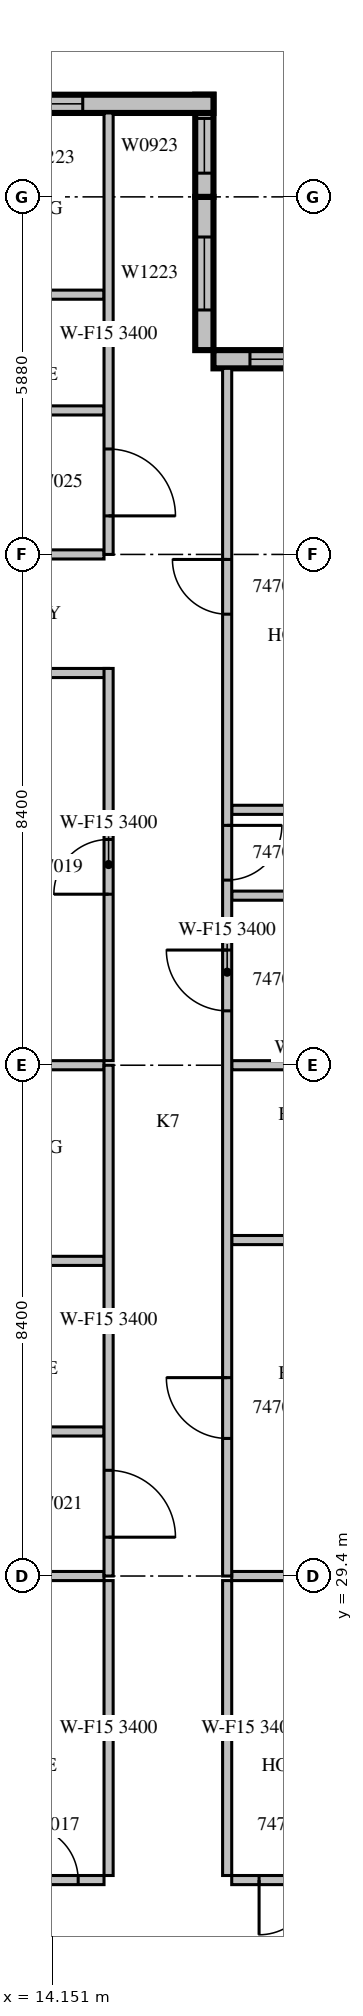
"""IFC4 building model, lengths in metres.
Left out: names, types, materials, properties, quantities, classifications, styles, units other than length and angle.
Written with IfcOpenShell. Run it as: python <this file> out.ifc"""

import sys

from ifc_helpers import new_model, si_unit, direction, frame, frame_2d, origin, place, context, subcontext, project, spatial, rectangle, extrude, source, transform, mapped, element, fill, save


model = new_model("IFC4")
c1 = context("Model", 3, precision=1e-05, world=origin(), true_north=direction((0.0, 1.0)))
c2 = subcontext(c1, "Body", "Model", "MODEL_VIEW")
j1 = project(units=[si_unit("LENGTHUNIT", "METRE"), si_unit("PLANEANGLEUNIT", "RADIAN")], contexts=[c1])
p1 = place(None, origin())
s1 = spatial("IfcSite", under=j1, at=p1, CompositionType="ELEMENT")
p2 = place(p1, origin())
s2 = spatial("IfcBuilding", under=s1, at=p2, CompositionType="ELEMENT")
p3 = place(p2, frame((0.0, 0.0, 212.0)))
s3 = spatial("IfcBuildingStorey", under=s2, at=p3, CompositionType="ELEMENT", Elevation=212.0)
m1 = source(origin(), c2, "Body", "SweptSolid", [
    extrude(rectangle(XDim=4.2, YDim=0.3, at=frame_2d((2.1, 0.0))), origin(), (0.0, 0.0, 1.0), 3.4),
])
p4 = place(p3, frame((21.0, 49.41, 0.0), z_axis=(0.0, 0.0, 1.0), x_axis=(-1.0, 0.0, 0.0)))
e1 = element("IfcWall", 1, at=p4, inside=s3, PredefinedType="STANDARD", context=c2, shape_type="MappedRepresentation", body=[
    mapped(m1, transform((0.0, 0.0, 0.0), scale=1.0)),
])
m2 = source(origin(), c2, "Body", "SweptSolid", [
    extrude(rectangle(XDim=3.0, YDim=2.3, at=frame_2d((1.5, 1.15))), frame((0.0, 0.16, 0.0), z_axis=(0.0, -1.0, 0.0), x_axis=(1.0, 0.0, 0.0)), (0.0, 0.0, 1.0), 0.32),
])
p5 = place(p4, frame((0.6, 0.0, 0.6)))
e2 = element("IfcOpeningElement", 2, at=p5, cuts=e1, PredefinedType="OPENING", context=c2, shape_type="MappedRepresentation", body=[
    mapped(m2, transform((0.0, 0.0, 0.0), scale=1.0)),
])
m3 = source(origin(), c2, "Body", "SweptSolid", [
    extrude(rectangle(XDim=2.52, YDim=0.3, at=frame_2d((1.26, 0.0))), origin(), (0.0, 0.0, 1.0), 3.4),
])
p6 = place(p3, frame((16.65, 49.56, 0.0), z_axis=(0.0, 0.0, 1.0), x_axis=(0.0, 1.0, 0.0)))
e3 = element("IfcWall", 3, at=p6, inside=s3, PredefinedType="STANDARD", context=c2, shape_type="MappedRepresentation", body=[
    mapped(m3, transform((0.0, 0.0, 0.0), scale=1.0)),
])
m4 = source(origin(), c2, "Body", "SweptSolid", [
    extrude(rectangle(XDim=1.2, YDim=2.3, at=frame_2d((0.6, 1.15))), frame((0.0, 0.16, 0.0), z_axis=(0.0, -1.0, 0.0), x_axis=(1.0, 0.0, 0.0)), (0.0, 0.0, 1.0), 0.32),
])
p7 = place(p6, frame((0.66, 0.0, 0.6)))
e4 = element("IfcOpeningElement", 4, at=p7, cuts=e3, PredefinedType="OPENING", context=c2, shape_type="MappedRepresentation", body=[
    mapped(m4, transform((0.0, 0.0, 0.0), scale=1.0)),
])
m5 = source(origin(), c2, "Body", "SweptSolid", [
    extrude(rectangle(XDim=1.68, YDim=0.3, at=frame_2d((0.84, 0.0))), origin(), (0.0, 0.0, 1.0), 3.4),
])
p8 = place(p3, frame((16.65, 52.08, 0.0), z_axis=(0.0, 0.0, 1.0), x_axis=(0.0, 1.0, 0.0)))
e5 = element("IfcWall", 5, at=p8, inside=s3, PredefinedType="STANDARD", context=c2, shape_type="MappedRepresentation", body=[
    mapped(m5, transform((0.0, 0.0, 0.0), scale=1.0)),
])
m6 = source(origin(), c2, "Body", "SweptSolid", [
    extrude(rectangle(XDim=0.9, YDim=2.3, at=frame_2d((0.45, 1.15))), frame((0.0, 0.16, 0.0), z_axis=(0.0, -1.0, 0.0), x_axis=(1.0, 0.0, 0.0)), (0.0, 0.0, 1.0), 0.32),
])
p9 = place(p8, frame((0.39, 0.0, 0.6)))
e6 = element("IfcOpeningElement", 6, at=p9, cuts=e5, PredefinedType="OPENING", context=c2, shape_type="MappedRepresentation", body=[
    mapped(m6, transform((0.0, 0.0, 0.0), scale=1.0)),
])
m7 = source(origin(), c2, "Body", "SweptSolid", [
    extrude(rectangle(XDim=10.5, YDim=0.3, at=frame_2d((5.25, 0.0))), origin(), (0.0, 0.0, 1.0), 3.4),
])
p10 = place(p3, frame((16.8, 53.61, 0.0), z_axis=(0.0, 0.0, 1.0), x_axis=(-1.0, 0.0, 0.0)))
e7 = element("IfcWall", 7, at=p10, inside=s3, PredefinedType="STANDARD", context=c2, shape_type="MappedRepresentation", body=[
    mapped(m7, transform((0.0, 0.0, 0.0), scale=1.0)),
])
p11 = place(p10, frame((2.15, 0.0, 0.6)))
e8 = element("IfcOpeningElement", 8, at=p11, cuts=e7, PredefinedType="OPENING", context=c2, shape_type="MappedRepresentation", body=[
    mapped(m4, transform((0.0, 0.0, 0.0), scale=1.0)),
])
m8 = source(origin(), c2, "Body", "SweptSolid", [
    extrude(rectangle(XDim=1.8, YDim=2.3, at=frame_2d((0.9, 1.15))), frame((0.0, 0.16, 0.0), z_axis=(0.0, -1.0, 0.0), x_axis=(1.0, 0.0, 0.0)), (0.0, 0.0, 1.0), 0.32),
])
p12 = place(p10, frame((8.025, 0.0, 0.6)))
e9 = element("IfcOpeningElement", 9, at=p12, cuts=e7, PredefinedType="OPENING", context=c2, shape_type="MappedRepresentation", body=[
    mapped(m8, transform((0.0, 0.0, 0.0), scale=1.0)),
])
m9 = source(origin(), c2, "Body", "SweptSolid", [
    extrude(rectangle(XDim=8.495, YDim=0.15, at=frame_2d((4.247, 0.0))), origin(), (0.0, 0.0, 1.0), 3.4),
])
p13 = place(p3, frame((6.505, 24.4, 0.0), z_axis=(0.0, 0.0, 1.0), x_axis=(1.0, 0.0, 0.0)))
e10 = element("IfcWall", 10, at=p13, inside=s3, PredefinedType="PARTITIONING", context=c2, shape_type="MappedRepresentation", body=[
    mapped(m9, transform((0.0, 0.0, 0.0), scale=1.0)),
])
m10 = source(origin(), c2, "Body", "SweptSolid", [
    extrude(rectangle(XDim=0.9, YDim=2.1, at=frame_2d((0.45, 1.05))), frame((0.0, 0.085, 0.0), z_axis=(0.0, -1.0, 0.0), x_axis=(1.0, 0.0, 0.0)), (0.0, 0.0, 1.0), 0.17),
])
p14 = place(p13, frame((2.095, 0.0, 0.0)))
e11 = element("IfcOpeningElement", 11, at=p14, cuts=e10, PredefinedType="OPENING", context=c2, shape_type="MappedRepresentation", body=[
    mapped(m10, transform((0.0, 0.0, 0.0), scale=1.0)),
])
p15 = place(p13, frame((7.17, 0.0, 0.0)))
e12 = element("IfcOpeningElement", 12, at=p15, cuts=e10, PredefinedType="OPENING", context=c2, shape_type="MappedRepresentation", body=[
    mapped(m10, transform((0.0, 0.0, 0.0), scale=1.0)),
])
m11 = source(origin(), c2, "Body", "SweptSolid", [
    extrude(rectangle(XDim=3.6, YDim=0.15, at=frame_2d((1.8, 0.0))), origin(), (0.0, 0.0, 1.0), 3.4),
])
p16 = place(p3, frame((17.1, 24.4, 0.0), z_axis=(0.0, 0.0, 1.0), x_axis=(1.0, 0.0, 0.0)))
e13 = element("IfcWall", 13, at=p16, inside=s3, PredefinedType="PARTITIONING", context=c2, shape_type="MappedRepresentation", body=[
    mapped(m11, transform((0.0, 0.0, 0.0), scale=1.0)),
])
p17 = place(p16, frame((0.45, 0.0, 0.0)))
e14 = element("IfcOpeningElement", 14, at=p17, cuts=e13, PredefinedType="OPENING", context=c2, shape_type="MappedRepresentation", body=[
    mapped(m10, transform((0.0, 0.0, 0.0), scale=1.0)),
])
m12 = source(origin(), c2, "Body", "SweptSolid", [
    extrude(rectangle(XDim=4.85, YDim=0.15, at=frame_2d((2.425, 0.0))), origin(), (0.0, 0.0, 1.0), 3.4),
])
for number, where, z_axis, x_axis in (
    (15, (15.075, 24.475, 0.0), (0.0, 0.0, 1.0), (0.0, 1.0, 0.0)),
    (16, (17.025, 29.325, 0.0), (0.0, 0.0, 1.0), (0.0, -1.0, 0.0)),
):
    element("IfcWall", number, at=place(p3, frame(where, z_axis=z_axis, x_axis=x_axis)), inside=s3, PredefinedType="PARTITIONING", context=c2, shape_type="MappedRepresentation", body=[
        mapped(m12, transform((0.0, 0.0, 0.0), scale=1.0)),
    ])
m13 = source(origin(), c2, "Body", "SweptSolid", [
    extrude(rectangle(XDim=4.051, YDim=0.15, at=frame_2d((2.026, 0.0))), origin(), (0.0, 0.0, 1.0), 3.4),
])
p18 = place(p3, frame((15.0, 29.4, 0.0), z_axis=(0.0, 0.0, 1.0), x_axis=(-1.0, 0.0, 0.0)))
e17 = element("IfcWall", 17, at=p18, inside=s3, PredefinedType="PARTITIONING", context=c2, shape_type="MappedRepresentation", body=[
    mapped(m13, transform((0.0, 0.0, 0.0), scale=1.0)),
])
m14 = source(origin(), c2, "Body", "SweptSolid", [
    extrude(rectangle(XDim=3.001, YDim=0.15, at=frame_2d((1.5, 0.0))), origin(), (0.0, 0.0, 1.0), 3.4),
])
p19 = place(p3, frame((20.101, 29.4, 0.0), z_axis=(0.0, 0.0, 1.0), x_axis=(-1.0, 0.0, 0.0)))
e18 = element("IfcWall", 18, at=p19, inside=s3, PredefinedType="PARTITIONING", context=c2, shape_type="MappedRepresentation", body=[
    mapped(m14, transform((0.0, 0.0, 0.0), scale=1.0)),
])
m15 = source(origin(), c2, "Body", "SweptSolid", [
    extrude(rectangle(XDim=3.575, YDim=0.15, at=frame_2d((1.788, 0.0))), origin(), (0.0, 0.0, 1.0), 3.4),
])
p20 = place(p3, frame((15.075, 44.25, 0.0), z_axis=(0.0, 0.0, 1.0), x_axis=(-1.0, 0.0, 0.0)))
e19 = element("IfcWall", 19, at=p20, inside=s3, PredefinedType="PARTITIONING", context=c2, shape_type="MappedRepresentation", body=[
    mapped(m15, transform((0.0, 0.0, 0.0), scale=1.0)),
])
m16 = source(origin(), c2, "Body", "SweptSolid", [
    extrude(rectangle(XDim=6.45, YDim=0.15, at=frame_2d((3.225, 0.0))), origin(), (0.0, 0.0, 1.0), 3.4),
])
p21 = place(p3, frame((15.075, 37.875, 0.0), z_axis=(0.0, 0.0, 1.0), x_axis=(0.0, 1.0, 0.0)))
e20 = element("IfcWall", 20, at=p21, inside=s3, PredefinedType="PARTITIONING", context=c2, shape_type="MappedRepresentation", body=[
    mapped(m16, transform((0.0, 0.0, 0.0), scale=1.0)),
])
p22 = place(p21, frame((2.737, 0.0, 0.0)))
e21 = element("IfcOpeningElement", 21, at=p22, cuts=e20, PredefinedType="OPENING", context=c2, shape_type="MappedRepresentation", body=[
    mapped(m10, transform((0.0, 0.0, 0.0), scale=1.0)),
])
m17 = source(origin(), c2, "Body", "SweptSolid", [
    extrude(rectangle(XDim=3.9, YDim=0.15, at=frame_2d((1.95, 0.0))), origin(), (0.0, 0.0, 1.0), 3.4),
])
for number, where, z_axis, x_axis in (
    (22, (15.0, 31.777, 0.0), (0.0, 0.0, 1.0), (-1.0, 0.0, 0.0)),
    (23, (15.0, 34.583, 0.0), (0.0, 0.0, 1.0), (-1.0, 0.0, 0.0)),
    (24, (15.0, 37.8, 0.0), (0.0, 0.0, 1.0), (-1.0, 0.0, 0.0)),
    (25, (15.0, 48.568, 0.0), (0.0, 0.0, 1.0), (-1.0, 0.0, 0.0)),
    (26, (15.0, 50.472, 0.0), (0.0, 0.0, 1.0), (-1.0, 0.0, 0.0)),
    (27, (15.0, 46.2, 0.0), (0.0, 0.0, 1.0), (-1.0, 0.0, 0.0)),
):
    element("IfcWall", number, at=place(p3, frame(where, z_axis=z_axis, x_axis=x_axis)), inside=s3, PredefinedType="PARTITIONING", context=c2, shape_type="MappedRepresentation", body=[
        mapped(m17, transform((0.0, 0.0, 0.0), scale=1.0)),
    ])
p23 = place(p3, frame((17.1, 34.925, 0.0), z_axis=(0.0, 0.0, 1.0), x_axis=(1.0, 0.0, 0.0)))
e28 = element("IfcWall", 28, at=p23, inside=s3, PredefinedType="PARTITIONING", context=c2, shape_type="MappedRepresentation", body=[
    mapped(m11, transform((0.0, 0.0, 0.0), scale=1.0)),
])
p24 = place(p23, frame((1.35, 0.0, 0.0)))
e29 = element("IfcOpeningElement", 29, at=p24, cuts=e28, PredefinedType="OPENING", context=c2, shape_type="MappedRepresentation", body=[
    mapped(m10, transform((0.0, 0.0, 0.0), scale=1.0)),
])
p25 = place(p3, frame((17.1, 40.589, 0.0), z_axis=(0.0, 0.0, 1.0), x_axis=(1.0, 0.0, 0.0)))
e30 = element("IfcWall", 30, at=p25, inside=s3, PredefinedType="PARTITIONING", context=c2, shape_type="MappedRepresentation", body=[
    mapped(m11, transform((0.0, 0.0, 0.0), scale=1.0)),
])
p26 = place(p3, frame((20.101, 37.8, 0.0), z_axis=(0.0, 0.0, 1.0), x_axis=(-1.0, 0.0, 0.0)))
e31 = element("IfcWall", 31, at=p26, inside=s3, PredefinedType="PARTITIONING", context=c2, shape_type="MappedRepresentation", body=[
    mapped(m14, transform((0.0, 0.0, 0.0), scale=1.0)),
])
p27 = place(p3, frame((20.7, 42.0, 0.0), z_axis=(0.0, 0.0, 1.0), x_axis=(-1.0, 0.0, 0.0)))
e32 = element("IfcWall", 32, at=p27, inside=s3, PredefinedType="PARTITIONING", context=c2, shape_type="MappedRepresentation", body=[
    mapped(m11, transform((0.0, 0.0, 0.0), scale=1.0)),
])
m18 = source(origin(), c2, "Body", "SweptSolid", [
    extrude(rectangle(XDim=8.4, YDim=0.15, at=frame_2d((4.2, 0.0))), origin(), (0.0, 0.0, 1.0), 3.4),
])
p28 = place(p3, frame((15.075, 29.4, 0.0), z_axis=(0.0, 0.0, 1.0), x_axis=(0.0, 1.0, 0.0)))
e33 = element("IfcWall", 33, at=p28, inside=s3, PredefinedType="PARTITIONING", context=c2, shape_type="MappedRepresentation", body=[
    mapped(m18, transform((0.0, 0.0, 0.0), scale=1.0)),
])
m19 = source(origin(), c2, "Body", "SweptSolid", [
    extrude(rectangle(XDim=1.1, YDim=2.1, at=frame_2d((0.55, 1.05))), frame((0.0, 0.085, 0.0), z_axis=(0.0, -1.0, 0.0), x_axis=(1.0, 0.0, 0.0)), (0.0, 0.0, 1.0), 0.17),
])
p29 = place(p28, frame((0.638, 0.0, 0.0)))
e34 = element("IfcOpeningElement", 34, at=p29, cuts=e33, PredefinedType="OPENING", context=c2, shape_type="MappedRepresentation", body=[
    mapped(m19, transform((0.0, 0.0, 0.0), scale=1.0)),
])
m20 = source(origin(), c2, "Body", "SweptSolid", [
    extrude(rectangle(XDim=7.26, YDim=0.15, at=frame_2d((3.63, 0.0))), origin(), (0.0, 0.0, 1.0), 3.4),
])
p30 = place(p3, frame((15.075, 46.2, 0.0), z_axis=(0.0, 0.0, 1.0), x_axis=(0.0, 1.0, 0.0)))
e35 = element("IfcWall", 35, at=p30, inside=s3, PredefinedType="PARTITIONING", context=c2, shape_type="MappedRepresentation", body=[
    mapped(m20, transform((0.0, 0.0, 0.0), scale=1.0)),
])
p31 = place(p30, frame((0.634, 0.0, 0.0)))
e36 = element("IfcOpeningElement", 36, at=p31, cuts=e35, PredefinedType="OPENING", context=c2, shape_type="MappedRepresentation", body=[
    mapped(m19, transform((0.0, 0.0, 0.0), scale=1.0)),
])
m21 = source(origin(), c2, "Body", "SweptSolid", [
    extrude(rectangle(XDim=19.86, YDim=0.15, at=frame_2d((9.93, 0.0))), origin(), (0.0, 0.0, 1.0), 3.4),
])
p32 = place(p3, frame((17.025, 49.26, 0.0), z_axis=(0.0, 0.0, 1.0), x_axis=(0.0, -1.0, 0.0)))
e37 = element("IfcWall", 37, at=p32, inside=s3, PredefinedType="PARTITIONING", context=c2, shape_type="MappedRepresentation", body=[
    mapped(m21, transform((0.0, 0.0, 0.0), scale=1.0)),
])
m22 = source(origin(), c2, "Body", "SweptSolid", [
    extrude(rectangle(XDim=1.0, YDim=2.1, at=frame_2d((0.5, 1.05))), frame((0.0, 0.085, 0.0), z_axis=(0.0, -1.0, 0.0), x_axis=(1.0, 0.0, 0.0)), (0.0, 0.0, 1.0), 0.17),
])
p33 = place(p32, frame((16.598, 0.0, 0.0)))
e38 = element("IfcOpeningElement", 38, at=p33, cuts=e37, PredefinedType="OPENING", context=c2, shape_type="MappedRepresentation", body=[
    mapped(m22, transform((0.0, 0.0, 0.0), scale=1.0)),
])
p34 = place(p32, frame((9.566, 0.0, 0.0)))
e39 = element("IfcOpeningElement", 39, at=p34, cuts=e37, PredefinedType="OPENING", context=c2, shape_type="MappedRepresentation", body=[
    mapped(m22, transform((0.0, 0.0, 0.0), scale=1.0)),
])
p35 = place(p32, frame((7.516, 0.0, 0.0)))
e40 = element("IfcOpeningElement", 40, at=p35, cuts=e37, PredefinedType="OPENING", context=c2, shape_type="MappedRepresentation", body=[
    mapped(m10, transform((0.0, 0.0, 0.0), scale=1.0)),
])
p36 = place(p32, frame((3.143, 0.0, 0.0)))
e41 = element("IfcOpeningElement", 41, at=p36, cuts=e37, PredefinedType="OPENING", context=c2, shape_type="MappedRepresentation", body=[
    mapped(m10, transform((0.0, 0.0, 0.0), scale=1.0)),
])
m23 = source(origin(), c2, "Body", "SweptSolid", [
    extrude(rectangle(XDim=3.0, YDim=2.3, at=frame_2d((1.5, 1.15))), frame((0.0, 0.03, 0.0), z_axis=(0.0, -1.0, 0.0), x_axis=(1.0, 0.0, 0.0)), (0.0, 0.0, 1.0), 0.06),
])
p37 = place(p5, origin())
e42 = element("IfcWindow", 42, at=p37, inside=s3, PartitioningType="SINGLE_PANEL", PredefinedType="WINDOW", context=c2, shape_type="MappedRepresentation", body=[
    mapped(m23, transform((0.0, 0.0, 0.0), scale=1.0)),
])
fill(e2, e42)
m24 = source(origin(), c2, "Body", "SweptSolid", [
    extrude(rectangle(XDim=1.2, YDim=2.3, at=frame_2d((0.6, 1.15))), frame((0.0, 0.03, 0.0), z_axis=(0.0, -1.0, 0.0), x_axis=(1.0, 0.0, 0.0)), (0.0, 0.0, 1.0), 0.06),
])
p38 = place(p7, origin())
e43 = element("IfcWindow", 43, at=p38, inside=s3, PartitioningType="SINGLE_PANEL", PredefinedType="WINDOW", context=c2, shape_type="MappedRepresentation", body=[
    mapped(m24, transform((0.0, 0.0, 0.0), scale=1.0)),
])
fill(e4, e43)
m25 = source(origin(), c2, "Body", "SweptSolid", [
    extrude(rectangle(XDim=0.9, YDim=2.3, at=frame_2d((0.45, 1.15))), frame((0.0, 0.03, 0.0), z_axis=(0.0, -1.0, 0.0), x_axis=(1.0, 0.0, 0.0)), (0.0, 0.0, 1.0), 0.06),
])
p39 = place(p9, origin())
e44 = element("IfcWindow", 44, at=p39, inside=s3, PartitioningType="SINGLE_PANEL", PredefinedType="WINDOW", context=c2, shape_type="MappedRepresentation", body=[
    mapped(m25, transform((0.0, 0.0, 0.0), scale=1.0)),
])
fill(e6, e44)
p40 = place(p11, origin())
e45 = element("IfcWindow", 45, at=p40, inside=s3, PartitioningType="SINGLE_PANEL", PredefinedType="WINDOW", context=c2, shape_type="MappedRepresentation", body=[
    mapped(m24, transform((0.0, 0.0, 0.0), scale=1.0)),
])
fill(e8, e45)
m26 = source(origin(), c2, "Body", "SweptSolid", [
    extrude(rectangle(XDim=0.9, YDim=2.1, at=frame_2d((0.45, 1.05))), frame((0.0, 0.025, 0.0), z_axis=(0.0, -1.0, 0.0), x_axis=(1.0, 0.0, 0.0)), (0.0, 0.0, 1.0), 0.05),
])
p41 = place(p15, origin())
e46 = element("IfcDoor", 46, at=p41, inside=s3, OperationType="SINGLE_SWING_LEFT", PredefinedType="DOOR", context=c2, shape_type="MappedRepresentation", body=[
    mapped(m26, transform((0.0, 0.0, 0.0), scale=1.0)),
])
fill(e12, e46)
p42 = place(p17, origin())
e47 = element("IfcDoor", 47, at=p42, inside=s3, OperationType="SINGLE_SWING_RIGHT", PredefinedType="DOOR", context=c2, shape_type="MappedRepresentation", body=[
    mapped(m26, transform((0.0, 0.0, 0.0), scale=1.0)),
])
fill(e14, e47)
p43 = place(p22, origin())
e48 = element("IfcDoor", 48, at=p43, inside=s3, OperationType="SINGLE_SWING_LEFT", PredefinedType="DOOR", context=c2, shape_type="MappedRepresentation", body=[
    mapped(m26, transform((0.0, 0.0, 0.0), scale=1.0)),
])
fill(e21, e48)
m27 = source(origin(), c2, "Body", "SweptSolid", [
    extrude(rectangle(XDim=1.1, YDim=2.1, at=frame_2d((0.55, 1.05))), frame((0.0, 0.025, 0.0), z_axis=(0.0, -1.0, 0.0), x_axis=(1.0, 0.0, 0.0)), (0.0, 0.0, 1.0), 0.05),
])
p44 = place(p29, origin())
e49 = element("IfcDoor", 49, at=p44, inside=s3, OperationType="SINGLE_SWING_RIGHT", PredefinedType="DOOR", context=c2, shape_type="MappedRepresentation", body=[
    mapped(m27, transform((0.0, 0.0, 0.0), scale=1.0)),
])
fill(e34, e49)
p45 = place(p31, origin())
e50 = element("IfcDoor", 50, at=p45, inside=s3, OperationType="SINGLE_SWING_RIGHT", PredefinedType="DOOR", context=c2, shape_type="MappedRepresentation", body=[
    mapped(m27, transform((0.0, 0.0, 0.0), scale=1.0)),
])
fill(e36, e50)
m28 = source(origin(), c2, "Body", "SweptSolid", [
    extrude(rectangle(XDim=1.0, YDim=2.1, at=frame_2d((0.5, 1.05))), frame((0.0, 0.025, 0.0), z_axis=(0.0, -1.0, 0.0), x_axis=(1.0, 0.0, 0.0)), (0.0, 0.0, 1.0), 0.05),
])
p46 = place(p33, origin())
e51 = element("IfcDoor", 51, at=p46, inside=s3, OperationType="SINGLE_SWING_RIGHT", PredefinedType="DOOR", context=c2, shape_type="MappedRepresentation", body=[
    mapped(m28, transform((0.0, 0.0, 0.0), scale=1.0)),
])
fill(e38, e51)
p47 = place(p34, origin())
e52 = element("IfcDoor", 52, at=p47, inside=s3, OperationType="SINGLE_SWING_RIGHT", PredefinedType="DOOR", context=c2, shape_type="MappedRepresentation", body=[
    mapped(m28, transform((0.0, 0.0, 0.0), scale=1.0)),
])
fill(e39, e52)
p48 = place(p35, origin())
e53 = element("IfcDoor", 53, at=p48, inside=s3, OperationType="SINGLE_SWING_LEFT", PredefinedType="DOOR", context=c2, shape_type="MappedRepresentation", body=[
    mapped(m26, transform((0.0, 0.0, 0.0), scale=1.0)),
])
fill(e40, e53)
p49 = place(p36, origin())
e54 = element("IfcDoor", 54, at=p49, inside=s3, OperationType="SINGLE_SWING_RIGHT", PredefinedType="DOOR", context=c2, shape_type="MappedRepresentation", body=[
    mapped(m26, transform((0.0, 0.0, 0.0), scale=1.0)),
])
fill(e41, e54)
save(model, sys.argv[1])
